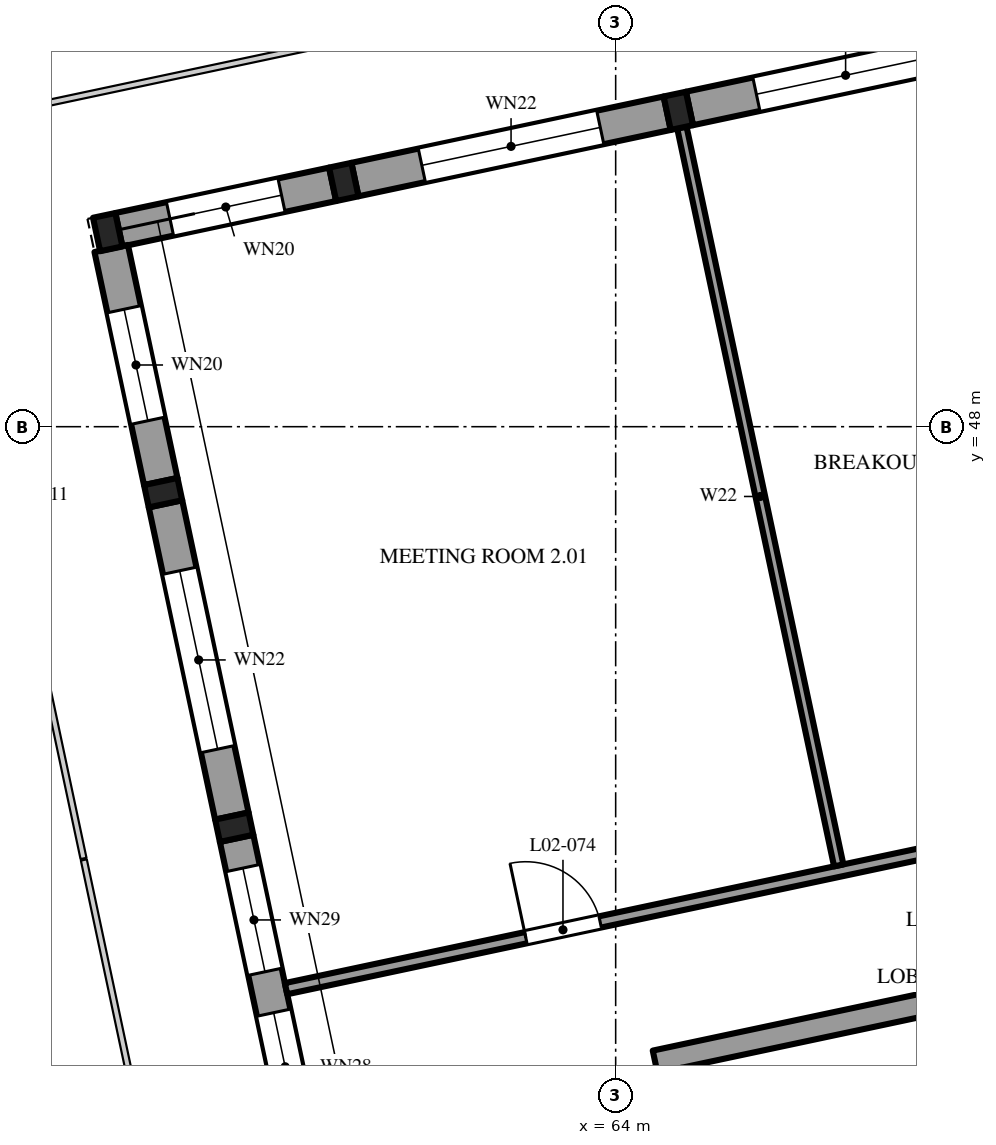
"""IFC4 building model, lengths in metres.
Left out: names, types, materials, properties, quantities, classifications, styles, units other than length and angle.
Written with IfcOpenShell. Run it as: python <this file> out.ifc"""

import sys

from ifc_helpers import new_model, si_unit, direction, frame, frame_2d, origin, origin_2d, place, context, subcontext, project, spatial, rectangle, i_section, extrude, element, fill, save


model = new_model("IFC4")
c1 = context("Model", 3, precision=1e-05, world=origin(), true_north=direction((0.0, 1.0)))
c2 = subcontext(c1, "Body", "Model", "MODEL_VIEW")
j1 = project(units=[si_unit("LENGTHUNIT", "METRE"), si_unit("PLANEANGLEUNIT", "RADIAN")], contexts=[c1])
p1 = place(None, origin())
s1 = spatial("IfcSite", under=j1, at=p1, CompositionType="ELEMENT")
p2 = place(p1, origin())
s2 = spatial("IfcBuilding", under=s1, at=p2, CompositionType="ELEMENT")
p3 = place(p2, frame((0.0, 0.0, 12.0)))
s3 = spatial("IfcBuildingStorey", under=s2, at=p3, CompositionType="ELEMENT", Elevation=12.0)
for number, where, z_axis, x_axis in (
    (1, (57.317, 50.56, 0.0), (0.0, 0.0, 1.0), (0.978, 0.208, 0.0)),
    (2, (60.423, 51.22, 0.0), (0.0, 0.0, 1.0), (0.978, 0.208, 0.0)),
    (3, (64.824, 52.156, 0.0), (0.0, 0.0, 1.0), (0.978, 0.208, 0.0)),
    (4, (58.981, 42.73, 0.0), (0.0, 0.0, 1.0), (-0.208, 0.978, 0.0)),
    (5, (58.046, 47.132, 0.0), (0.0, 0.0, 1.0), (-0.208, 0.978, 0.0)),
):
    element("IfcColumn", number, at=place(p3, frame(where, z_axis=z_axis, x_axis=x_axis)), inside=s3, PredefinedType="COLUMN", context=c2, shape_type="SweptSolid", body=[
        extrude(i_section(OverallWidth=0.3, OverallDepth=0.45, WebThickness=0.014, FlangeThickness=0.026, FilletRadius=0.027, at=origin_2d()), origin(), (0.0, 0.0, 1.0), 4.8),
    ])
p4 = place(p3, frame((64.519, 39.644, 0.0), z_axis=(0.0, 0.0, 1.0), x_axis=(0.978147662755, 0.20791139903, 0.0)))
e6 = element("IfcWall", 6, at=p4, inside=s3, PredefinedType="SHEAR", context=c2, shape_type="SweptSolid", body=[
    extrude(rectangle(XDim=13.7, YDim=0.3, at=frame_2d((6.85, 0.0))), origin(), (0.0, 0.0, 1.0), 4.8),
])
p5 = place(p4, frame((5.1, 0.0, 0.0)))
e7 = element("IfcOpeningElement", 7, at=p5, cuts=e6, PredefinedType="OPENING", context=c2, shape_type="SweptSolid", body=[
    extrude(rectangle(XDim=1.1, YDim=2.1, at=frame_2d((0.55, 1.05))), frame((0.0, 0.16, 0.0), z_axis=(0.0, -1.0, 0.0), x_axis=(1.0, 0.0, 0.0)), (0.0, 0.0, 1.0), 0.32),
])
p6 = place(p4, frame((7.5, 0.0, 0.0)))
e8 = element("IfcOpeningElement", 8, at=p6, cuts=e6, PredefinedType="OPENING", context=c2, shape_type="SweptSolid", body=[
    extrude(rectangle(XDim=1.1, YDim=2.1, at=frame_2d((0.55, 1.05))), frame((0.0, 0.16, 0.0), z_axis=(0.0, -1.0, 0.0), x_axis=(1.0, 0.0, 0.0)), (0.0, 0.0, 1.0), 0.32),
])
p7 = place(p3, frame((57.464, 50.592, 0.0), z_axis=(0.0, 0.0, 1.0), x_axis=(0.978155181918, 0.207876020951, 0.0)))
e9 = element("IfcWall", 9, at=p7, inside=s3, PredefinedType="SOLIDWALL", context=c2, shape_type="SweptSolid", body=[
    extrude(rectangle(XDim=2.875, YDim=0.45, at=frame_2d((1.438, 0.0))), origin(), (0.0, 0.0, 1.0), 4.35),
])
p8 = place(p7, frame((0.688, 0.0, 0.9)))
e10 = element("IfcOpeningElement", 10, at=p8, cuts=e9, PredefinedType="OPENING", context=c2, shape_type="SweptSolid", body=[
    extrude(rectangle(XDim=1.5, YDim=2.4, at=frame_2d((0.75, 1.2))), frame((0.0, 0.235, 0.0), z_axis=(0.0, -1.0, 0.0), x_axis=(1.0, 0.0, 0.0)), (0.0, 0.0, 1.0), 0.47),
])
p9 = place(p3, frame((60.57, 51.251, 0.0), z_axis=(0.0, 0.0, 1.0), x_axis=(0.978143927149, 0.207928972925, 0.0)))
e11 = element("IfcWall", 11, at=p9, inside=s3, PredefinedType="SOLIDWALL", context=c2, shape_type="SweptSolid", body=[
    extrude(rectangle(XDim=4.2, YDim=0.45, at=frame_2d((2.1, 0.0))), origin(), (0.0, 0.0, 1.0), 4.35),
])
p10 = place(p9, frame((0.9, 0.0, 0.9)))
e12 = element("IfcOpeningElement", 12, at=p10, cuts=e11, PredefinedType="OPENING", context=c2, shape_type="SweptSolid", body=[
    extrude(rectangle(XDim=2.4, YDim=2.4, at=frame_2d((1.2, 1.2))), frame((0.0, 0.235, 0.0), z_axis=(0.0, -1.0, 0.0), x_axis=(1.0, 0.0, 0.0)), (0.0, 0.0, 1.0), 0.47),
])
p11 = place(p3, frame((64.971, 52.187, 0.0), z_axis=(0.0, 0.0, 1.0), x_axis=(0.978155748334, 0.207873355681, 0.0)))
e13 = element("IfcWall", 13, at=p11, inside=s3, PredefinedType="SOLIDWALL", context=c2, shape_type="SweptSolid", body=[
    extrude(rectangle(XDim=4.2, YDim=0.45, at=frame_2d((2.1, 0.0))), origin(), (0.0, 0.0, 1.0), 4.35),
])
p12 = place(p11, frame((0.9, 0.0, 0.9)))
e14 = element("IfcOpeningElement", 14, at=p12, cuts=e13, PredefinedType="OPENING", context=c2, shape_type="SweptSolid", body=[
    extrude(rectangle(XDim=2.4, YDim=2.4, at=frame_2d((1.2, 1.2))), frame((0.0, 0.235, 0.0), z_axis=(0.0, -1.0, 0.0), x_axis=(1.0, 0.0, 0.0)), (0.0, 0.0, 1.0), 0.47),
])
p13 = place(p3, frame((59.886, 38.475, 0.0), z_axis=(0.0, 0.0, 1.0), x_axis=(-0.207928972925, 0.978143927149, 0.0)))
e15 = element("IfcWall", 15, at=p13, inside=s3, PredefinedType="SOLIDWALL", context=c2, shape_type="SweptSolid", body=[
    extrude(rectangle(XDim=4.2, YDim=0.45, at=frame_2d((2.1, 0.0))), origin(), (0.0, 0.0, 1.0), 4.35),
])
p14 = place(p13, frame((0.4, 0.0, 0.9)))
e16 = element("IfcOpeningElement", 16, at=p14, cuts=e15, PredefinedType="OPENING", context=c2, shape_type="SweptSolid", body=[
    extrude(rectangle(XDim=1.455, YDim=2.4, at=frame_2d((0.728, 1.2))), frame((0.0, 0.235, 0.0), z_axis=(0.0, -1.0, 0.0), x_axis=(1.0, 0.0, 0.0)), (0.0, 0.0, 1.0), 0.47),
])
p15 = place(p13, frame((2.405, 0.0, 0.9)))
e17 = element("IfcOpeningElement", 17, at=p15, cuts=e15, PredefinedType="OPENING", context=c2, shape_type="SweptSolid", body=[
    extrude(rectangle(XDim=1.395, YDim=2.4, at=frame_2d((0.698, 1.2))), frame((0.0, 0.235, 0.0), z_axis=(0.0, -1.0, 0.0), x_axis=(1.0, 0.0, 0.0)), (0.0, 0.0, 1.0), 0.47),
])
p16 = place(p3, frame((58.95, 42.877, 0.0), z_axis=(0.0, 0.0, 1.0), x_axis=(-0.207873355681, 0.978155748334, 0.0)))
e18 = element("IfcWall", 18, at=p16, inside=s3, PredefinedType="SOLIDWALL", context=c2, shape_type="SweptSolid", body=[
    extrude(rectangle(XDim=4.2, YDim=0.45, at=frame_2d((2.1, 0.0))), origin(), (0.0, 0.0, 1.0), 4.35),
])
p17 = place(p16, frame((0.9, 0.0, 0.9)))
e19 = element("IfcOpeningElement", 19, at=p17, cuts=e18, PredefinedType="OPENING", context=c2, shape_type="SweptSolid", body=[
    extrude(rectangle(XDim=2.4, YDim=2.4, at=frame_2d((1.2, 1.2))), frame((0.0, 0.235, 0.0), z_axis=(0.0, -1.0, 0.0), x_axis=(1.0, 0.0, 0.0)), (0.0, 0.0, 1.0), 0.47),
])
p18 = place(p3, frame((58.015, 47.279, 0.0), z_axis=(0.0, 0.0, 1.0), x_axis=(-0.207933268122, 0.978143014087, 0.0)))
e20 = element("IfcWall", 20, at=p18, inside=s3, PredefinedType="SOLIDWALL", context=c2, shape_type="SweptSolid", body=[
    extrude(rectangle(XDim=3.135, YDim=0.45, at=frame_2d((1.567, 0.0))), origin(), (0.0, 0.0, 1.0), 4.35),
])
p19 = place(p18, frame((0.817, 0.0, 0.9)))
e21 = element("IfcOpeningElement", 21, at=p19, cuts=e20, PredefinedType="OPENING", context=c2, shape_type="SweptSolid", body=[
    extrude(rectangle(XDim=1.5, YDim=2.4, at=frame_2d((0.75, 1.2))), frame((0.0, 0.235, 0.0), z_axis=(0.0, -1.0, 0.0), x_axis=(1.0, 0.0, 0.0)), (0.0, 0.0, 1.0), 0.47),
])
p20 = place(p3, frame((59.663, 40.605, 0.0), z_axis=(0.0, 0.0, 1.0), x_axis=(0.978147466509, 0.207912322295, 0.0)))
e22 = element("IfcWall", 22, at=p20, inside=s3, PredefinedType="PARTITIONING", context=c2, shape_type="SweptSolid", body=[
    extrude(rectangle(XDim=34.45, YDim=0.15, at=frame_2d((17.225, 0.0))), origin(), (0.0, 0.0, 1.0), 3.75),
])
p21 = place(p20, frame((3.225, 0.0, 0.0)))
e23 = element("IfcOpeningElement", 23, at=p21, cuts=e22, PredefinedType="OPENING", context=c2, shape_type="SweptSolid", body=[
    extrude(rectangle(XDim=1.0, YDim=2.1, at=frame_2d((0.5, 1.05))), frame((0.0, 0.085, 0.0), z_axis=(0.0, -1.0, 0.0), x_axis=(1.0, 0.0, 0.0)), (0.0, 0.0, 1.0), 0.17),
])
p22 = place(p20, frame((9.2, 0.0, 0.0)))
e24 = element("IfcOpeningElement", 24, at=p22, cuts=e22, PredefinedType="OPENING", context=c2, shape_type="SweptSolid", body=[
    extrude(rectangle(XDim=1.0, YDim=2.1, at=frame_2d((0.5, 1.05))), frame((0.0, 0.085, 0.0), z_axis=(0.0, -1.0, 0.0), x_axis=(1.0, 0.0, 0.0)), (0.0, 0.0, 1.0), 0.17),
])
p23 = place(p20, frame((15.55, 0.0, 0.0)))
e25 = element("IfcOpeningElement", 25, at=p23, cuts=e22, PredefinedType="OPENING", context=c2, shape_type="SweptSolid", body=[
    extrude(rectangle(XDim=1.8, YDim=2.1, at=frame_2d((0.9, 1.05))), frame((0.0, 0.085, 0.0), z_axis=(0.0, -1.0, 0.0), x_axis=(1.0, 0.0, 0.0)), (0.0, 0.0, 1.0), 0.17),
])
p24 = place(p20, frame((26.8, 0.0, 0.0)))
e26 = element("IfcOpeningElement", 26, at=p24, cuts=e22, PredefinedType="OPENING", context=c2, shape_type="SweptSolid", body=[
    extrude(rectangle(XDim=1.8, YDim=2.1, at=frame_2d((0.9, 1.05))), frame((0.0, 0.085, 0.0), z_axis=(0.0, -1.0, 0.0), x_axis=(1.0, 0.0, 0.0)), (0.0, 0.0, 1.0), 0.17),
])
p25 = place(p3, frame((64.871, 51.936, 0.0), z_axis=(0.0, 0.0, 1.0), x_axis=(0.20790935802, -0.978148096582, 0.0)))
e27 = element("IfcWall", 27, at=p25, inside=s3, PredefinedType="PARTITIONING", context=c2, shape_type="SweptSolid", body=[
    extrude(rectangle(XDim=9.925, YDim=0.125, at=frame_2d((4.962, 0.0))), origin(), (0.0, 0.0, 1.0), 3.75),
])
p26 = place(p8, origin())
e28 = element("IfcWindow", 28, at=p26, inside=s3, PartitioningType="SINGLE_PANEL", PredefinedType="WINDOW", context=c2, shape_type="SweptSolid", body=[
    extrude(rectangle(XDim=1.5, YDim=2.4, at=frame_2d((0.75, 1.2))), frame((0.0, 0.03, 0.0), z_axis=(0.0, -1.0, 0.0), x_axis=(1.0, 0.0, 0.0)), (0.0, 0.0, 1.0), 0.06),
])
fill(e10, e28)
p27 = place(p10, origin())
e29 = element("IfcWindow", 29, at=p27, inside=s3, PartitioningType="SINGLE_PANEL", PredefinedType="WINDOW", context=c2, shape_type="SweptSolid", body=[
    extrude(rectangle(XDim=2.4, YDim=2.4, at=frame_2d((1.2, 1.2))), frame((0.0, 0.03, 0.0), z_axis=(0.0, -1.0, 0.0), x_axis=(1.0, 0.0, 0.0)), (0.0, 0.0, 1.0), 0.06),
])
fill(e12, e29)
p28 = place(p12, origin())
e30 = element("IfcWindow", 30, at=p28, inside=s3, PartitioningType="SINGLE_PANEL", PredefinedType="WINDOW", context=c2, shape_type="SweptSolid", body=[
    extrude(rectangle(XDim=2.4, YDim=2.4, at=frame_2d((1.2, 1.2))), frame((0.0, 0.03, 0.0), z_axis=(0.0, -1.0, 0.0), x_axis=(1.0, 0.0, 0.0)), (0.0, 0.0, 1.0), 0.06),
])
fill(e14, e30)
p29 = place(p14, origin())
e31 = element("IfcWindow", 31, at=p29, inside=s3, PartitioningType="SINGLE_PANEL", PredefinedType="WINDOW", context=c2, shape_type="SweptSolid", body=[
    extrude(rectangle(XDim=1.455, YDim=2.4, at=frame_2d((0.728, 1.2))), frame((0.0, 0.03, 0.0), z_axis=(0.0, -1.0, 0.0), x_axis=(1.0, 0.0, 0.0)), (0.0, 0.0, 1.0), 0.06),
])
fill(e16, e31)
p30 = place(p15, origin())
e32 = element("IfcWindow", 32, at=p30, inside=s3, PartitioningType="SINGLE_PANEL", PredefinedType="WINDOW", context=c2, shape_type="SweptSolid", body=[
    extrude(rectangle(XDim=1.395, YDim=2.4, at=frame_2d((0.698, 1.2))), frame((0.0, 0.03, 0.0), z_axis=(0.0, -1.0, 0.0), x_axis=(1.0, 0.0, 0.0)), (0.0, 0.0, 1.0), 0.06),
])
fill(e17, e32)
p31 = place(p17, origin())
e33 = element("IfcWindow", 33, at=p31, inside=s3, PartitioningType="SINGLE_PANEL", PredefinedType="WINDOW", context=c2, shape_type="SweptSolid", body=[
    extrude(rectangle(XDim=2.4, YDim=2.4, at=frame_2d((1.2, 1.2))), frame((0.0, 0.03, 0.0), z_axis=(0.0, -1.0, 0.0), x_axis=(1.0, 0.0, 0.0)), (0.0, 0.0, 1.0), 0.06),
])
fill(e19, e33)
p32 = place(p19, origin())
e34 = element("IfcWindow", 34, at=p32, inside=s3, PartitioningType="SINGLE_PANEL", PredefinedType="WINDOW", context=c2, shape_type="SweptSolid", body=[
    extrude(rectangle(XDim=1.5, YDim=2.4, at=frame_2d((0.75, 1.2))), frame((0.0, 0.03, 0.0), z_axis=(0.0, -1.0, 0.0), x_axis=(1.0, 0.0, 0.0)), (0.0, 0.0, 1.0), 0.06),
])
fill(e21, e34)
p33 = place(p21, origin())
e35 = element("IfcDoor", 35, at=p33, inside=s3, OperationType="SINGLE_SWING_RIGHT", PredefinedType="DOOR", context=c2, shape_type="SweptSolid", body=[
    extrude(rectangle(XDim=1.0, YDim=2.1, at=frame_2d((0.5, 1.05))), frame((0.0, 0.025, 0.0), z_axis=(0.0, -1.0, 0.0), x_axis=(1.0, 0.0, 0.0)), (0.0, 0.0, 1.0), 0.05),
])
fill(e23, e35)
save(model, sys.argv[1])
